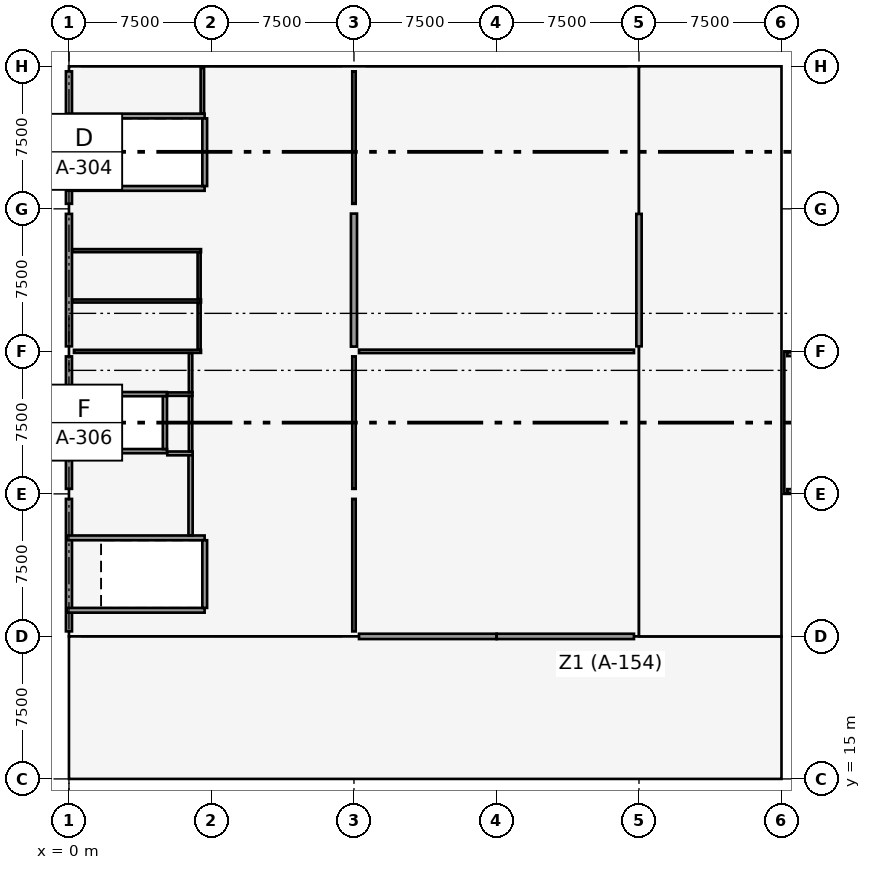
"""IFC4 building model, lengths in metres.
Left out: names, types, materials, properties, quantities, classifications, styles, units other than length and angle.
Written with IfcOpenShell. Run it as: python <this file> out.ifc"""

import sys

from ifc_helpers import new_model, si_unit, direction, frame, frame_2d, origin, origin_2d, place, context, subcontext, project, spatial, rectangle, extrude, element, fill, save


model = new_model("IFC4")
c1 = context("Model", 3, precision=1e-05, world=origin(), true_north=direction((0.0, 1.0)))
c2 = subcontext(c1, "Body", "Model", "MODEL_VIEW")
j1 = project(units=[si_unit("LENGTHUNIT", "METRE"), si_unit("PLANEANGLEUNIT", "RADIAN")], contexts=[c1])
p1 = place(None, origin())
s1 = spatial("IfcSite", under=j1, at=p1, CompositionType="ELEMENT")
p2 = place(p1, origin())
s2 = spatial("IfcBuilding", under=s1, at=p2, CompositionType="ELEMENT")
p3 = place(p2, frame((0.0, 0.0, 17.1)))
s3 = spatial("IfcBuildingStorey", under=s2, at=p3, CompositionType="ELEMENT", Elevation=17.1)
for number, where, z_axis, x_axis in (
    (1, (0.0, 22.5, 0.0), (0.0, 0.0, 1.0), (1.0, 0.0, 0.0)),
    (2, (0.0, 30.0, 0.0), (0.0, 0.0, 1.0), (1.0, 0.0, 0.0)),
    (3, (0.0, 37.5, 0.0), (0.0, 0.0, 1.0), (1.0, 0.0, 0.0)),
    (4, (0.0, 45.0, 0.0), (0.0, 0.0, 1.0), (1.0, 0.0, 0.0)),
    (5, (0.0, 52.5, 0.0), (0.0, 0.0, 1.0), (1.0, 0.0, 0.0)),
    (6, (15.0, 22.5, 0.0), (0.0, 0.0, 1.0), (1.0, 0.0, 0.0)),
    (7, (15.0, 30.0, 0.0), (0.0, 0.0, 1.0), (1.0, 0.0, 0.0)),
    (8, (15.0, 37.5, 0.0), (0.0, 0.0, 1.0), (1.0, 0.0, 0.0)),
    (9, (15.0, 45.0, 0.0), (0.0, 0.0, 1.0), (1.0, 0.0, 0.0)),
    (10, (15.0, 52.5, 0.0), (0.0, 0.0, 1.0), (1.0, 0.0, 0.0)),
    (11, (30.0, 22.5, 0.0), (0.0, 0.0, 1.0), (1.0, 0.0, 0.0)),
    (12, (30.0, 30.0, 0.0), (0.0, 0.0, 1.0), (1.0, 0.0, 0.0)),
    (13, (30.0, 37.5, 0.0), (0.0, 0.0, 1.0), (1.0, 0.0, 0.0)),
    (14, (30.0, 45.0, 0.0), (0.0, 0.0, 1.0), (1.0, 0.0, 0.0)),
    (15, (30.0, 52.5, 0.0), (0.0, 0.0, 1.0), (1.0, 0.0, 0.0)),
):
    element("IfcColumn", number, at=place(p3, frame(where, z_axis=z_axis, x_axis=x_axis)), inside=s3, PredefinedType="COLUMN", context=c2, shape_type="SweptSolid", body=[
        extrude(rectangle(XDim=0.5, YDim=0.5, at=origin_2d()), origin(), (0.0, 0.0, 1.0), 3.9),
    ])
p4 = place(p3, frame((15.0, 37.75, 0.0), z_axis=(0.0, 0.0, 1.0), x_axis=(0.0, 1.0, 0.0)))
e16 = element("IfcWall", 16, at=p4, inside=s3, PredefinedType="SHEAR", context=c2, shape_type="SweptSolid", body=[
    extrude(rectangle(XDim=7.0, YDim=0.32, at=frame_2d((3.5, 0.0))), origin(), (0.0, 0.0, 1.0), 3.6),
])
p5 = place(p3, frame((15.265, 22.5, 0.0), z_axis=(0.0, 0.0, 1.0), x_axis=(1.0, 0.0, 0.0)))
e17 = element("IfcWall", 17, at=p5, inside=s3, PredefinedType="SOLIDWALL", context=c2, shape_type="SweptSolid", body=[
    extrude(rectangle(XDim=7.24, YDim=0.28, at=frame_2d((3.62, 0.0))), origin(), (0.0, 0.0, 1.0), 2.59),
])
p6 = place(p5, frame((3.04, 0.0, 0.0)))
e18 = element("IfcOpeningElement", 18, at=p6, cuts=e17, PredefinedType="OPENING", context=c2, shape_type="SweptSolid", body=[
    extrude(rectangle(XDim=1.5, YDim=2.15, at=frame_2d((0.75, 1.075))), frame((0.0, 0.15, 0.0), z_axis=(0.0, -1.0, 0.0), x_axis=(1.0, 0.0, 0.0)), (0.0, 0.0, 1.0), 0.3),
])
p7 = place(p3, frame((22.51, 22.5, 0.0), z_axis=(0.0, 0.0, 1.0), x_axis=(1.0, 0.0, 0.0)))
e19 = element("IfcWall", 19, at=p7, inside=s3, PredefinedType="SOLIDWALL", context=c2, shape_type="SweptSolid", body=[
    extrude(rectangle(XDim=7.225, YDim=0.28, at=frame_2d((3.613, 0.0))), origin(), (0.0, 0.0, 1.0), 2.59),
])
p8 = place(p7, frame((2.685, 0.0, 0.0)))
e20 = element("IfcOpeningElement", 20, at=p8, cuts=e19, PredefinedType="OPENING", context=c2, shape_type="SweptSolid", body=[
    extrude(rectangle(XDim=1.5, YDim=2.15, at=frame_2d((0.75, 1.075))), frame((0.0, 0.15, 0.0), z_axis=(0.0, -1.0, 0.0), x_axis=(1.0, 0.0, 0.0)), (0.0, 0.0, 1.0), 0.3),
])
for number, where, z_axis, x_axis in (
    (21, (0.0, 22.765, 0.0), (0.0, 0.0, 1.0), (0.0, 1.0, 0.0)),
    (22, (0.0, 30.265, 0.0), (0.0, 0.0, 1.0), (0.0, 1.0, 0.0)),
    (23, (0.0, 37.765, 0.0), (0.0, 0.0, 1.0), (0.0, 1.0, 0.0)),
):
    element("IfcWall", number, at=place(p3, frame(where, z_axis=z_axis, x_axis=x_axis)), inside=s3, PredefinedType="SOLIDWALL", context=c2, shape_type="SweptSolid", body=[
        extrude(rectangle(XDim=6.97, YDim=0.32, at=frame_2d((3.485, 0.0))), origin(), (0.0, 0.0, 1.0), 2.59),
    ])
p9 = place(p3, frame((30.0, 37.765, 0.0), z_axis=(0.0, 0.0, 1.0), x_axis=(0.0, 1.0, 0.0)))
e24 = element("IfcWall", 24, at=p9, inside=s3, PredefinedType="SOLIDWALL", context=c2, shape_type="SweptSolid", body=[
    extrude(rectangle(XDim=6.97, YDim=0.28, at=frame_2d((3.485, 0.0))), origin(), (0.0, 0.0, 1.0), 2.59),
])
p10 = place(p9, frame((2.735, 0.0, 0.0)))
e25 = element("IfcOpeningElement", 25, at=p10, cuts=e24, PredefinedType="OPENING", context=c2, shape_type="SweptSolid", body=[
    extrude(rectangle(XDim=1.5, YDim=2.15, at=frame_2d((0.75, 1.075))), frame((0.0, 0.15, 0.0), z_axis=(0.0, -1.0, 0.0), x_axis=(1.0, 0.0, 0.0)), (0.0, 0.0, 1.0), 0.3),
])
p11 = place(p3, frame((0.0, 45.265, 0.0), z_axis=(0.0, 0.0, 1.0), x_axis=(0.0, 1.0, 0.0)))
e26 = element("IfcWall", 26, at=p11, inside=s3, PredefinedType="SOLIDWALL", context=c2, shape_type="SweptSolid", body=[
    extrude(rectangle(XDim=6.97, YDim=0.32, at=frame_2d((3.485, 0.0))), origin(), (0.0, 0.0, 1.0), 2.59),
])
for number, where, z_axis, x_axis in (
    (27, (37.8, 30.15, 0.55), (0.0, 0.0, 1.0), (1.0, 0.0, 0.0)),
    (28, (37.8, 37.35, 0.55), (0.0, 0.0, 1.0), (1.0, 0.0, 0.0)),
):
    element("IfcWall", number, at=place(p3, frame(where, z_axis=z_axis, x_axis=x_axis)), inside=s3, PredefinedType="PARAPET", context=c2, shape_type="SweptSolid", body=[
        extrude(rectangle(XDim=14.4, YDim=0.2, at=frame_2d((7.2, 0.0))), origin(), (0.0, 0.0, 1.0), 1.12),
    ])
p12 = place(p3, frame((-0.12, 23.875, 0.0), z_axis=(0.0, 0.0, 1.0), x_axis=(1.0, 0.0, 0.0)))
e29 = element("IfcWall", 29, at=p12, inside=s3, PredefinedType="SOLIDWALL", context=c2, shape_type="SweptSolid", body=[
    extrude(rectangle(XDim=7.26, YDim=0.25, at=frame_2d((3.63, 0.0))), origin(), (0.0, 0.0, 1.0), 3.62),
])
p13 = place(p3, frame((-0.12, 27.685, 0.0), z_axis=(0.0, 0.0, 1.0), x_axis=(1.0, 0.0, 0.0)))
e30 = element("IfcWall", 30, at=p13, inside=s3, PredefinedType="SOLIDWALL", context=c2, shape_type="SweptSolid", body=[
    extrude(rectangle(XDim=7.26, YDim=0.25, at=frame_2d((3.63, 0.0))), origin(), (0.0, 0.0, 1.0), 3.62),
])
p14 = place(p13, frame((0.45, 0.0, 0.0)))
e31 = element("IfcOpeningElement", 31, at=p14, cuts=e30, PredefinedType="OPENING", context=c2, shape_type="SweptSolid", body=[
    extrude(rectangle(XDim=1.1, YDim=2.15, at=frame_2d((0.55, 1.075))), frame((0.0, 0.135, 0.0), z_axis=(0.0, -1.0, 0.0), x_axis=(1.0, 0.0, 0.0)), (0.0, 0.0, 1.0), 0.27),
])
p15 = place(p3, frame((7.145, 24.0, 0.0), z_axis=(0.0, 0.0, 1.0), x_axis=(0.0, 1.0, 0.0)))
e32 = element("IfcWall", 32, at=p15, inside=s3, PredefinedType="SOLIDWALL", context=c2, shape_type="SweptSolid", body=[
    extrude(rectangle(XDim=3.56, YDim=0.25, at=frame_2d((1.78, 0.0))), origin(), (0.0, 0.0, 1.0), 3.62),
])
p16 = place(p3, frame((-0.12, 46.075, 0.0), z_axis=(0.0, 0.0, 1.0), x_axis=(1.0, 0.0, 0.0)))
e33 = element("IfcWall", 33, at=p16, inside=s3, PredefinedType="SOLIDWALL", context=c2, shape_type="SweptSolid", body=[
    extrude(rectangle(XDim=7.26, YDim=0.25, at=frame_2d((3.63, 0.0))), origin(), (0.0, 0.0, 1.0), 3.62),
])
p17 = place(p16, frame((0.56, 0.0, 0.0)))
e34 = element("IfcOpeningElement", 34, at=p17, cuts=e33, PredefinedType="OPENING", context=c2, shape_type="SweptSolid", body=[
    extrude(rectangle(XDim=1.1, YDim=2.15, at=frame_2d((0.55, 1.075))), frame((0.0, 0.135, 0.0), z_axis=(0.0, -1.0, 0.0), x_axis=(1.0, 0.0, 0.0)), (0.0, 0.0, 1.0), 0.27),
])
p18 = place(p3, frame((-0.12, 49.885, 0.0), z_axis=(0.0, 0.0, 1.0), x_axis=(1.0, 0.0, 0.0)))
e35 = element("IfcWall", 35, at=p18, inside=s3, PredefinedType="SOLIDWALL", context=c2, shape_type="SweptSolid", body=[
    extrude(rectangle(XDim=7.26, YDim=0.25, at=frame_2d((3.63, 0.0))), origin(), (0.0, 0.0, 1.0), 3.62),
])
p19 = place(p3, frame((7.145, 46.2, 0.0), z_axis=(0.0, 0.0, 1.0), x_axis=(0.0, 1.0, 0.0)))
e36 = element("IfcWall", 36, at=p19, inside=s3, PredefinedType="SOLIDWALL", context=c2, shape_type="SweptSolid", body=[
    extrude(rectangle(XDim=3.56, YDim=0.25, at=frame_2d((1.78, 0.0))), origin(), (0.0, 0.0, 1.0), 3.62),
])
p20 = place(p3, frame((2.34, 32.25, 0.0), z_axis=(0.0, 0.0, 1.0), x_axis=(1.0, 0.0, 0.0)))
e37 = element("IfcWall", 37, at=p20, inside=s3, PredefinedType="SOLIDWALL", context=c2, shape_type="SweptSolid", body=[
    extrude(rectangle(XDim=2.82, YDim=0.22, at=frame_2d((1.41, 0.0))), origin(), (0.0, 0.0, 1.0), 3.62),
])
p21 = place(p20, frame((0.86, 0.0, 0.0)))
e38 = element("IfcOpeningElement", 38, at=p21, cuts=e37, PredefinedType="OPENING", context=c2, shape_type="SweptSolid", body=[
    extrude(rectangle(XDim=1.1, YDim=2.15, at=frame_2d((0.55, 1.075))), frame((0.0, 0.12, 0.0), z_axis=(0.0, -1.0, 0.0), x_axis=(1.0, 0.0, 0.0)), (0.0, 0.0, 1.0), 0.24),
])
p22 = place(p3, frame((2.34, 35.25, 0.0), z_axis=(0.0, 0.0, 1.0), x_axis=(1.0, 0.0, 0.0)))
e39 = element("IfcWall", 39, at=p22, inside=s3, PredefinedType="SOLIDWALL", context=c2, shape_type="SweptSolid", body=[
    extrude(rectangle(XDim=2.82, YDim=0.22, at=frame_2d((1.41, 0.0))), origin(), (0.0, 0.0, 1.0), 3.62),
])
for number, where, z_axis, x_axis in (
    (40, (2.45, 32.36, 0.0), (0.0, 0.0, 1.0), (0.0, 1.0, 0.0)),
    (41, (5.05, 32.36, 0.0), (0.0, 0.0, 1.0), (0.0, 1.0, 0.0)),
):
    element("IfcWall", number, at=place(p3, frame(where, z_axis=z_axis, x_axis=x_axis)), inside=s3, PredefinedType="SOLIDWALL", context=c2, shape_type="SweptSolid", body=[
        extrude(rectangle(XDim=2.78, YDim=0.22, at=frame_2d((1.39, 0.0))), origin(), (0.0, 0.0, 1.0), 3.62),
    ])
p23 = place(p3, frame((6.4, 27.82, 0.0), z_axis=(0.0, 0.0, 1.0), x_axis=(0.0, 1.0, 0.0)))
e42 = element("IfcWall", 42, at=p23, inside=s3, PredefinedType="SOLIDWALL", context=c2, shape_type="SweptSolid", body=[
    extrude(rectangle(XDim=4.31, YDim=0.22, at=frame_2d((2.155, 0.0))), origin(), (0.0, 0.0, 1.0), 3.62),
])
p24 = place(p23, frame((0.45, 0.0, 0.0)))
e43 = element("IfcOpeningElement", 43, at=p24, cuts=e42, PredefinedType="OPENING", context=c2, shape_type="SweptSolid", body=[
    extrude(rectangle(XDim=1.1, YDim=2.15, at=frame_2d((0.55, 1.075))), frame((0.0, 0.12, 0.0), z_axis=(0.0, -1.0, 0.0), x_axis=(1.0, 0.0, 0.0)), (0.0, 0.0, 1.0), 0.24),
])
p25 = place(p3, frame((0.18, 32.13, 0.0), z_axis=(0.0, 0.0, 1.0), x_axis=(1.0, 0.0, 0.0)))
e44 = element("IfcWall", 44, at=p25, inside=s3, PredefinedType="PARTITIONING", context=c2, shape_type="SweptSolid", body=[
    extrude(rectangle(XDim=2.145, YDim=0.2, at=frame_2d((1.073, 0.0))), origin(), (0.0, 0.0, 1.0), 3.0),
])
p26 = place(p3, frame((5.175, 32.13, 0.0), z_axis=(0.0, 0.0, 1.0), x_axis=(1.0, 0.0, 0.0)))
e45 = element("IfcWall", 45, at=p26, inside=s3, PredefinedType="PARTITIONING", context=c2, shape_type="SweptSolid", body=[
    extrude(rectangle(XDim=1.335, YDim=0.2, at=frame_2d((0.667, 0.0))), origin(), (0.0, 0.0, 1.0), 3.33),
])
p27 = place(p3, frame((0.174, 35.25, 0.0), z_axis=(0.0, 0.0, 1.0), x_axis=(1.0, 0.0, 0.0)))
e46 = element("IfcWall", 46, at=p27, inside=s3, PredefinedType="PARTITIONING", context=c2, shape_type="SweptSolid", body=[
    extrude(rectangle(XDim=2.166, YDim=0.18, at=frame_2d((1.083, 0.0))), origin(), (0.0, 0.0, 1.0), 2.97),
])
p28 = place(p3, frame((5.16, 35.25, 0.0), z_axis=(0.0, 0.0, 1.0), x_axis=(1.0, 0.0, 0.0)))
e47 = element("IfcWall", 47, at=p28, inside=s3, PredefinedType="PARTITIONING", context=c2, shape_type="SweptSolid", body=[
    extrude(rectangle(XDim=1.34, YDim=0.18, at=frame_2d((0.67, 0.0))), origin(), (0.0, 0.0, 1.0), 2.97),
])
p29 = place(p3, frame((0.264, 37.5, 0.0), z_axis=(0.0, 0.0, 1.0), x_axis=(1.0, 0.0, 0.0)))
e48 = element("IfcWall", 48, at=p29, inside=s3, PredefinedType="PARTITIONING", context=c2, shape_type="SweptSolid", body=[
    extrude(rectangle(XDim=6.686, YDim=0.16, at=frame_2d((3.343, 0.0))), origin(), (0.0, 0.0, 1.0), 2.59),
])
p30 = place(p3, frame((6.4, 32.244, 0.0), z_axis=(0.0, 0.0, 1.0), x_axis=(0.0, 1.0, 0.0)))
e49 = element("IfcWall", 49, at=p30, inside=s3, PredefinedType="PARTITIONING", context=c2, shape_type="SweptSolid", body=[
    extrude(rectangle(XDim=2.902, YDim=0.18, at=frame_2d((1.451, 0.0))), origin(), (0.0, 0.0, 1.0), 2.97),
])
p31 = place(p3, frame((6.4, 35.354, 0.0), z_axis=(0.0, 0.0, 1.0), x_axis=(0.0, 1.0, 0.0)))
e50 = element("IfcWall", 50, at=p31, inside=s3, PredefinedType="PARTITIONING", context=c2, shape_type="SweptSolid", body=[
    extrude(rectangle(XDim=2.052, YDim=0.18, at=frame_2d((1.026, 0.0))), origin(), (0.0, 0.0, 1.0), 2.59),
])
p32 = place(p31, frame((0.546, 0.0, 0.0)))
e51 = element("IfcOpeningElement", 51, at=p32, cuts=e50, PredefinedType="OPENING", context=c2, shape_type="SweptSolid", body=[
    extrude(rectangle(XDim=0.9, YDim=2.1, at=frame_2d((0.45, 1.05))), frame((0.0, 0.1, 0.0), z_axis=(0.0, -1.0, 0.0), x_axis=(1.0, 0.0, 0.0)), (0.0, 0.0, 1.0), 0.2),
])
p33 = place(p3, frame((7.02, 50.024, 0.0), z_axis=(0.0, 0.0, 1.0), x_axis=(0.0, 1.0, 0.0)))
e52 = element("IfcWall", 52, at=p33, inside=s3, PredefinedType="PARTITIONING", context=c2, shape_type="SweptSolid", body=[
    extrude(rectangle(XDim=2.384, YDim=0.18, at=frame_2d((1.192, 0.0))), origin(), (0.0, 0.0, 1.0), 2.59),
])
for number, where, z_axis, x_axis in (
    (53, (0.174, 40.15, 0.0), (0.0, 0.0, 1.0), (1.0, 0.0, 0.0)),
    (54, (0.174, 42.8, 0.0), (0.0, 0.0, 1.0), (1.0, 0.0, 0.0)),
):
    element("IfcWall", number, at=place(p3, frame(where, z_axis=z_axis, x_axis=x_axis)), inside=s3, PredefinedType="PARTITIONING", context=c2, shape_type="SweptSolid", body=[
        extrude(rectangle(XDim=6.776, YDim=0.16, at=frame_2d((3.388, 0.0))), origin(), (0.0, 0.0, 1.0), 2.84),
    ])
p34 = place(p3, frame((6.85, 37.594, 0.0), z_axis=(0.0, 0.0, 1.0), x_axis=(0.0, 1.0, 0.0)))
e55 = element("IfcWall", 55, at=p34, inside=s3, PredefinedType="PARTITIONING", context=c2, shape_type="SweptSolid", body=[
    extrude(rectangle(XDim=2.462, YDim=0.16, at=frame_2d((1.231, 0.0))), origin(), (0.0, 0.0, 1.0), 2.59),
])
p35 = place(p34, frame((0.776, 0.0, 0.0)))
e56 = element("IfcOpeningElement", 56, at=p35, cuts=e55, PredefinedType="OPENING", context=c2, shape_type="SweptSolid", body=[
    extrude(rectangle(XDim=0.9, YDim=2.1, at=frame_2d((0.45, 1.05))), frame((0.0, 0.09, 0.0), z_axis=(0.0, -1.0, 0.0), x_axis=(1.0, 0.0, 0.0)), (0.0, 0.0, 1.0), 0.18),
])
p36 = place(p3, frame((6.85, 40.244, 0.0), z_axis=(0.0, 0.0, 1.0), x_axis=(0.0, 1.0, 0.0)))
e57 = element("IfcWall", 57, at=p36, inside=s3, PredefinedType="PARTITIONING", context=c2, shape_type="SweptSolid", body=[
    extrude(rectangle(XDim=2.462, YDim=0.16, at=frame_2d((1.231, 0.0))), origin(), (0.0, 0.0, 1.0), 2.97),
])
p37 = place(p36, frame((0.786, 0.0, 0.0)))
e58 = element("IfcOpeningElement", 58, at=p37, cuts=e57, PredefinedType="OPENING", context=c2, shape_type="SweptSolid", body=[
    extrude(rectangle(XDim=0.9, YDim=2.1, at=frame_2d((0.45, 1.05))), frame((0.0, 0.09, 0.0), z_axis=(0.0, -1.0, 0.0), x_axis=(1.0, 0.0, 0.0)), (0.0, 0.0, 1.0), 0.18),
])
p38 = place(p3, frame((15.264, 37.5, 0.0), z_axis=(0.0, 0.0, 1.0), x_axis=(1.0, 0.0, 0.0)))
e59 = element("IfcWall", 59, at=p38, inside=s3, PredefinedType="PARTITIONING", context=c2, shape_type="SweptSolid", body=[
    extrude(rectangle(XDim=14.472, YDim=0.18, at=frame_2d((7.236, 0.0))), origin(), (0.0, 0.0, 1.0), 2.59),
])
p39 = place(p3, frame((15.0, 22.764, 0.0), z_axis=(0.0, 0.0, 1.0), x_axis=(0.0, 1.0, 0.0)))
e60 = element("IfcWall", 60, at=p39, inside=s3, PredefinedType="PARTITIONING", context=c2, shape_type="SweptSolid", body=[
    extrude(rectangle(XDim=6.972, YDim=0.18, at=frame_2d((3.486, 0.0))), origin(), (0.0, 0.0, 1.0), 2.59),
])
p40 = place(p39, frame((2.736, 0.0, 0.0)))
e61 = element("IfcOpeningElement", 61, at=p40, cuts=e60, PredefinedType="OPENING", context=c2, shape_type="SweptSolid", body=[
    extrude(rectangle(XDim=1.5, YDim=2.16, at=frame_2d((0.75, 1.08))), frame((0.0, 0.1, 0.0), z_axis=(0.0, -1.0, 0.0), x_axis=(1.0, 0.0, 0.0)), (0.0, 0.0, 1.0), 0.2),
])
p41 = place(p3, frame((15.0, 30.264, 0.0), z_axis=(0.0, 0.0, 1.0), x_axis=(0.0, 1.0, 0.0)))
e62 = element("IfcWall", 62, at=p41, inside=s3, PredefinedType="PARTITIONING", context=c2, shape_type="SweptSolid", body=[
    extrude(rectangle(XDim=6.972, YDim=0.18, at=frame_2d((3.486, 0.0))), origin(), (0.0, 0.0, 1.0), 2.59),
])
p42 = place(p3, frame((15.0, 45.264, 0.0), z_axis=(0.0, 0.0, 1.0), x_axis=(0.0, 1.0, 0.0)))
e63 = element("IfcWall", 63, at=p42, inside=s3, PredefinedType="PARTITIONING", context=c2, shape_type="SweptSolid", body=[
    extrude(rectangle(XDim=6.972, YDim=0.18, at=frame_2d((3.486, 0.0))), origin(), (0.0, 0.0, 1.0), 2.59),
])
p43 = place(p42, frame((2.836, 0.0, 0.0)))
e64 = element("IfcOpeningElement", 64, at=p43, cuts=e63, PredefinedType="OPENING", context=c2, shape_type="SweptSolid", body=[
    extrude(rectangle(XDim=1.3, YDim=2.15, at=frame_2d((0.65, 1.075))), frame((0.0, 0.1, 0.0), z_axis=(0.0, -1.0, 0.0), x_axis=(1.0, 0.0, 0.0)), (0.0, 0.0, 1.0), 0.2),
])
p44 = place(p6, frame((1.5, 0.0, 0.0), z_axis=(0.0, 0.0, 1.0), x_axis=(-1.0, 0.0, 0.0)))
e65 = element("IfcDoor", 65, at=p44, inside=s3, OperationType="SINGLE_SWING_LEFT", PredefinedType="DOOR", context=c2, shape_type="SweptSolid", body=[
    extrude(rectangle(XDim=1.5, YDim=2.15, at=frame_2d((0.75, 1.075))), frame((0.0, 0.025, 0.0), z_axis=(0.0, -1.0, 0.0), x_axis=(1.0, 0.0, 0.0)), (0.0, 0.0, 1.0), 0.05),
])
fill(e18, e65)
p45 = place(p8, frame((1.5, 0.0, 0.0), z_axis=(0.0, 0.0, 1.0), x_axis=(-1.0, 0.0, 0.0)))
e66 = element("IfcDoor", 66, at=p45, inside=s3, OperationType="SINGLE_SWING_RIGHT", PredefinedType="DOOR", context=c2, shape_type="SweptSolid", body=[
    extrude(rectangle(XDim=1.5, YDim=2.15, at=frame_2d((0.75, 1.075))), frame((0.0, 0.025, 0.0), z_axis=(0.0, -1.0, 0.0), x_axis=(1.0, 0.0, 0.0)), (0.0, 0.0, 1.0), 0.05),
])
fill(e20, e66)
p46 = place(p10, frame((1.5, 0.0, 0.0), z_axis=(0.0, 0.0, 1.0), x_axis=(-1.0, 0.0, 0.0)))
e67 = element("IfcDoor", 67, at=p46, inside=s3, OperationType="SINGLE_SWING_LEFT", PredefinedType="DOOR", context=c2, shape_type="SweptSolid", body=[
    extrude(rectangle(XDim=1.5, YDim=2.15, at=frame_2d((0.75, 1.075))), frame((0.0, 0.025, 0.0), z_axis=(0.0, -1.0, 0.0), x_axis=(1.0, 0.0, 0.0)), (0.0, 0.0, 1.0), 0.05),
])
fill(e25, e67)
p47 = place(p14, origin())
e68 = element("IfcDoor", 68, at=p47, inside=s3, OperationType="SINGLE_SWING_RIGHT", PredefinedType="DOOR", context=c2, shape_type="SweptSolid", body=[
    extrude(rectangle(XDim=1.1, YDim=2.15, at=frame_2d((0.55, 1.075))), frame((0.0, 0.025, 0.0), z_axis=(0.0, -1.0, 0.0), x_axis=(1.0, 0.0, 0.0)), (0.0, 0.0, 1.0), 0.05),
])
fill(e31, e68)
p48 = place(p17, origin())
e69 = element("IfcDoor", 69, at=p48, inside=s3, OperationType="SINGLE_SWING_RIGHT", PredefinedType="DOOR", context=c2, shape_type="SweptSolid", body=[
    extrude(rectangle(XDim=1.1, YDim=2.15, at=frame_2d((0.55, 1.075))), frame((0.0, 0.025, 0.0), z_axis=(0.0, -1.0, 0.0), x_axis=(1.0, 0.0, 0.0)), (0.0, 0.0, 1.0), 0.05),
])
fill(e34, e69)
p49 = place(p21, origin())
e70 = element("IfcDoor", 70, at=p49, inside=s3, OperationType="SLIDING_TO_LEFT", PredefinedType="DOOR", context=c2, shape_type="SweptSolid", body=[
    extrude(rectangle(XDim=1.1, YDim=2.15, at=frame_2d((0.55, 1.075))), frame((0.0, 0.025, 0.0), z_axis=(0.0, -1.0, 0.0), x_axis=(1.0, 0.0, 0.0)), (0.0, 0.0, 1.0), 0.05),
])
fill(e38, e70)
p50 = place(p24, origin())
e71 = element("IfcDoor", 71, at=p50, inside=s3, OperationType="SINGLE_SWING_RIGHT", PredefinedType="DOOR", context=c2, shape_type="SweptSolid", body=[
    extrude(rectangle(XDim=1.1, YDim=2.15, at=frame_2d((0.55, 1.075))), frame((0.0, 0.025, 0.0), z_axis=(0.0, -1.0, 0.0), x_axis=(1.0, 0.0, 0.0)), (0.0, 0.0, 1.0), 0.05),
])
fill(e43, e71)
p51 = place(p32, origin())
e72 = element("IfcDoor", 72, at=p51, inside=s3, OperationType="SINGLE_SWING_LEFT", PredefinedType="DOOR", context=c2, shape_type="SweptSolid", body=[
    extrude(rectangle(XDim=0.9, YDim=2.1, at=frame_2d((0.45, 1.05))), frame((0.0, 0.025, 0.0), z_axis=(0.0, -1.0, 0.0), x_axis=(1.0, 0.0, 0.0)), (0.0, 0.0, 1.0), 0.05),
])
fill(e51, e72)
p52 = place(p35, origin())
e73 = element("IfcDoor", 73, at=p52, inside=s3, OperationType="SINGLE_SWING_RIGHT", PredefinedType="DOOR", context=c2, shape_type="SweptSolid", body=[
    extrude(rectangle(XDim=0.9, YDim=2.1, at=frame_2d((0.45, 1.05))), frame((0.0, 0.025, 0.0), z_axis=(0.0, -1.0, 0.0), x_axis=(1.0, 0.0, 0.0)), (0.0, 0.0, 1.0), 0.05),
])
fill(e56, e73)
p53 = place(p37, origin())
e74 = element("IfcDoor", 74, at=p53, inside=s3, OperationType="SINGLE_SWING_LEFT", PredefinedType="DOOR", context=c2, shape_type="SweptSolid", body=[
    extrude(rectangle(XDim=0.9, YDim=2.1, at=frame_2d((0.45, 1.05))), frame((0.0, 0.025, 0.0), z_axis=(0.0, -1.0, 0.0), x_axis=(1.0, 0.0, 0.0)), (0.0, 0.0, 1.0), 0.05),
])
fill(e58, e74)
p54 = place(p40, origin())
e75 = element("IfcDoor", 75, at=p54, inside=s3, OperationType="SINGLE_SWING_RIGHT", PredefinedType="DOOR", context=c2, shape_type="SweptSolid", body=[
    extrude(rectangle(XDim=1.5, YDim=2.16, at=frame_2d((0.75, 1.08))), frame((0.0, 0.025, 0.0), z_axis=(0.0, -1.0, 0.0), x_axis=(1.0, 0.0, 0.0)), (0.0, 0.0, 1.0), 0.05),
])
fill(e61, e75)
p55 = place(p43, origin())
e76 = element("IfcDoor", 76, at=p55, inside=s3, OperationType="SINGLE_SWING_LEFT", PredefinedType="DOOR", context=c2, shape_type="SweptSolid", body=[
    extrude(rectangle(XDim=1.3, YDim=2.15, at=frame_2d((0.65, 1.075))), frame((0.0, 0.025, 0.0), z_axis=(0.0, -1.0, 0.0), x_axis=(1.0, 0.0, 0.0)), (0.0, 0.0, 1.0), 0.05),
])
fill(e64, e76)
save(model, sys.argv[1])
